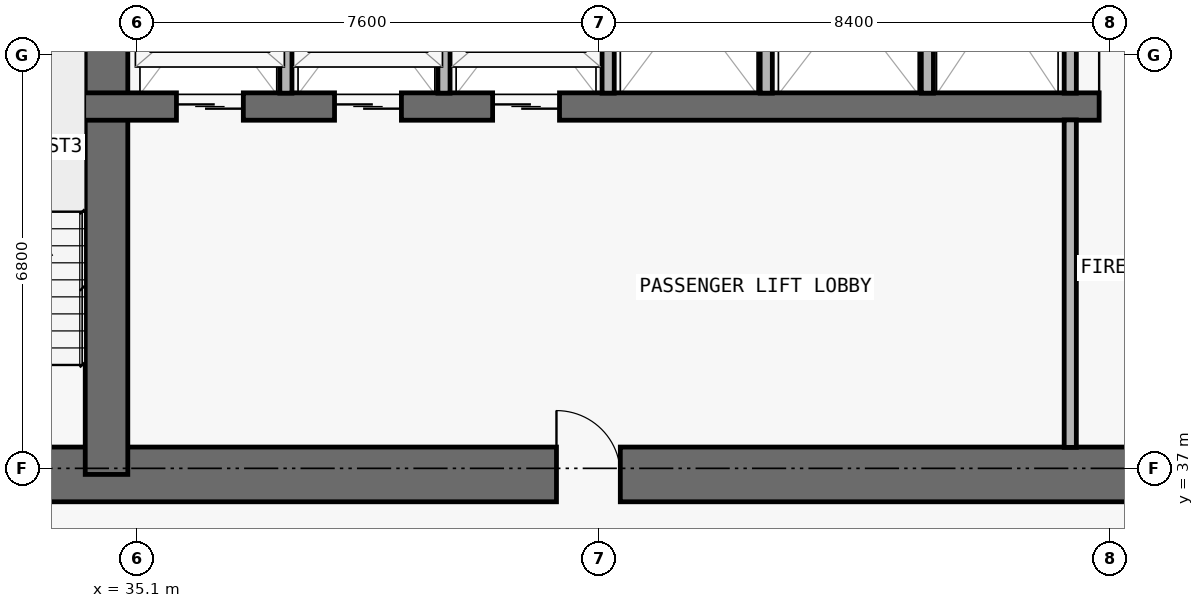
"""IFC4 building model, lengths in metres.
Left out: names, types, materials, properties, quantities, classifications, styles, units other than length and angle.
Written with IfcOpenShell. Run it as: python <this file> out.ifc"""

import sys

from ifc_helpers import new_model, si_unit, direction, frame, frame_2d, origin, place, context, subcontext, project, spatial, rectangle, extrude, element, fill, save


model = new_model("IFC4")
c1 = context("Model", 3, precision=1e-05, world=origin(), true_north=direction((0.0, 1.0)))
c2 = subcontext(c1, "Body", "Model", "MODEL_VIEW")
j1 = project(units=[si_unit("LENGTHUNIT", "METRE"), si_unit("PLANEANGLEUNIT", "RADIAN")], contexts=[c1])
p1 = place(None, origin())
s1 = spatial("IfcSite", under=j1, at=p1, CompositionType="ELEMENT")
p2 = place(p1, origin())
s2 = spatial("IfcBuilding", under=s1, at=p2, CompositionType="ELEMENT")
p3 = place(p2, frame((0.0, 0.0, 39.9)))
s3 = spatial("IfcBuildingStorey", under=s2, at=p3, CompositionType="ELEMENT", Elevation=39.9)
p4 = place(p3, frame((17.75, 36.9, 0.0), z_axis=(0.0, 0.0, 1.0), x_axis=(1.0, 0.0, 0.0)))
e1 = element("IfcWall", 1, at=p4, inside=s3, PredefinedType="SHEAR", context=c2, shape_type="SweptSolid", body=[
    extrude(rectangle(XDim=42.3, YDim=0.9, at=frame_2d((21.15, 0.0))), origin(), (0.0, 0.0, 1.0), 3.05),
])
p5 = place(p4, frame((14.55, 0.0, 0.0)))
e2 = element("IfcOpeningElement", 2, at=p5, cuts=e1, PredefinedType="OPENING", context=c2, shape_type="SweptSolid", body=[
    extrude(rectangle(XDim=1.1, YDim=2.15, at=frame_2d((0.55, 1.075))), frame((0.0, 0.46, 0.0), z_axis=(0.0, -1.0, 0.0), x_axis=(1.0, 0.0, 0.0)), (0.0, 0.0, 1.0), 0.92),
])
p6 = place(p4, frame((6.4, 0.0, 0.0)))
e3 = element("IfcOpeningElement", 3, at=p6, cuts=e1, PredefinedType="OPENING", context=c2, shape_type="SweptSolid", body=[
    extrude(rectangle(XDim=1.05, YDim=2.15, at=frame_2d((0.525, 1.075))), frame((0.0, 0.46, 0.0), z_axis=(0.0, -1.0, 0.0), x_axis=(1.0, 0.0, 0.0)), (0.0, 0.0, 1.0), 0.92),
])
p7 = place(p4, frame((34.9, 0.0, 0.0)))
e4 = element("IfcOpeningElement", 4, at=p7, cuts=e1, PredefinedType="OPENING", context=c2, shape_type="SweptSolid", body=[
    extrude(rectangle(XDim=1.05, YDim=2.15, at=frame_2d((0.525, 1.075))), frame((0.0, 0.46, 0.0), z_axis=(0.0, -1.0, 0.0), x_axis=(1.0, 0.0, 0.0)), (0.0, 0.0, 1.0), 0.92),
])
p8 = place(p4, frame((11.012, 0.0, 0.0)))
e5 = element("IfcOpeningElement", 5, at=p8, cuts=e1, PredefinedType="OPENING", context=c2, shape_type="SweptSolid", body=[
    extrude(rectangle(XDim=1.05, YDim=2.15, at=frame_2d((0.525, 1.075))), frame((0.0, 0.46, 0.0), z_axis=(0.0, -1.0, 0.0), x_axis=(1.0, 0.0, 0.0)), (0.0, 0.0, 1.0), 0.92),
])
p9 = place(p4, frame((24.25, 0.0, 0.0)))
e6 = element("IfcOpeningElement", 6, at=p9, cuts=e1, PredefinedType="OPENING", context=c2, shape_type="SweptSolid", body=[
    extrude(rectangle(XDim=1.05, YDim=2.15, at=frame_2d((0.525, 1.075))), frame((0.0, 0.46, 0.0), z_axis=(0.0, -1.0, 0.0), x_axis=(1.0, 0.0, 0.0)), (0.0, 0.0, 1.0), 0.92),
])
p10 = place(p3, frame((34.6, 36.9, 0.0), z_axis=(0.0, 0.0, 1.0), x_axis=(0.0, 1.0, 0.0)))
e7 = element("IfcWall", 7, at=p10, inside=s3, PredefinedType="SHEAR", context=c2, shape_type="SweptSolid", body=[
    extrude(rectangle(XDim=9.675, YDim=0.7, at=frame_2d((4.837, 0.0))), origin(), (0.0, 0.0, 1.0), 3.05),
])
p11 = place(p3, frame((22.25, 42.95, 0.0), z_axis=(0.0, 0.0, 1.0), x_axis=(1.0, 0.0, 0.0)))
e8 = element("IfcWall", 8, at=p11, inside=s3, PredefinedType="SHEAR", context=c2, shape_type="SweptSolid", body=[
    extrude(rectangle(XDim=33.3, YDim=0.45, at=frame_2d((16.65, 0.0))), origin(), (0.0, 0.0, 1.0), 3.05),
])
p12 = place(p11, frame((1.05, 0.0, 0.0)))
e9 = element("IfcOpeningElement", 9, at=p12, cuts=e8, PredefinedType="OPENING", context=c2, shape_type="SweptSolid", body=[
    extrude(rectangle(XDim=1.2, YDim=2.2, at=frame_2d((0.6, 1.1))), frame((0.0, 0.235, 0.0), z_axis=(0.0, -1.0, 0.0), x_axis=(1.0, 0.0, 0.0)), (0.0, 0.0, 1.0), 0.47),
])
p13 = place(p11, frame((31.05, 0.0, 0.0)))
e10 = element("IfcOpeningElement", 10, at=p13, cuts=e8, PredefinedType="OPENING", context=c2, shape_type="SweptSolid", body=[
    extrude(rectangle(XDim=1.2, YDim=2.2, at=frame_2d((0.6, 1.1))), frame((0.0, 0.235, 0.0), z_axis=(0.0, -1.0, 0.0), x_axis=(1.0, 0.0, 0.0)), (0.0, 0.0, 1.0), 0.47),
])
p14 = place(p11, frame((13.5, 0.0, 0.0)))
e11 = element("IfcOpeningElement", 11, at=p14, cuts=e8, PredefinedType="OPENING", context=c2, shape_type="SweptSolid", body=[
    extrude(rectangle(XDim=1.1, YDim=2.2, at=frame_2d((0.55, 1.1))), frame((0.0, 0.235, 0.0), z_axis=(0.0, -1.0, 0.0), x_axis=(1.0, 0.0, 0.0)), (0.0, 0.0, 1.0), 0.47),
])
p15 = place(p11, frame((16.1, 0.0, 0.0)))
e12 = element("IfcOpeningElement", 12, at=p15, cuts=e8, PredefinedType="OPENING", context=c2, shape_type="SweptSolid", body=[
    extrude(rectangle(XDim=1.1, YDim=2.2, at=frame_2d((0.55, 1.1))), frame((0.0, 0.235, 0.0), z_axis=(0.0, -1.0, 0.0), x_axis=(1.0, 0.0, 0.0)), (0.0, 0.0, 1.0), 0.47),
])
p16 = place(p11, frame((18.7, 0.0, 0.0)))
e13 = element("IfcOpeningElement", 13, at=p16, cuts=e8, PredefinedType="OPENING", context=c2, shape_type="SweptSolid", body=[
    extrude(rectangle(XDim=1.1, YDim=2.2, at=frame_2d((0.55, 1.1))), frame((0.0, 0.235, 0.0), z_axis=(0.0, -1.0, 0.0), x_axis=(1.0, 0.0, 0.0)), (0.0, 0.0, 1.0), 0.47),
])
p17 = place(p11, frame((3.625, 0.0, 0.0)))
e14 = element("IfcOpeningElement", 14, at=p17, cuts=e8, PredefinedType="OPENING", context=c2, shape_type="SweptSolid", body=[
    extrude(rectangle(XDim=1.05, YDim=2.15, at=frame_2d((0.525, 1.075))), frame((0.0, 0.235, 0.0), z_axis=(0.0, -1.0, 0.0), x_axis=(1.0, 0.0, 0.0)), (0.0, 0.0, 1.0), 0.47),
])
p18 = place(p11, frame((28.675, 0.0, 0.0)))
e15 = element("IfcOpeningElement", 15, at=p18, cuts=e8, PredefinedType="OPENING", context=c2, shape_type="SweptSolid", body=[
    extrude(rectangle(XDim=1.05, YDim=2.15, at=frame_2d((0.525, 1.075))), frame((0.0, 0.235, 0.0), z_axis=(0.0, -1.0, 0.0), x_axis=(1.0, 0.0, 0.0)), (0.0, 0.0, 1.0), 0.47),
])
for number, where, z_axis, x_axis in (
    (16, (37.55, 43.17, 0.0), (0.0, 0.0, 1.0), (0.0, 1.0, 0.0)),
    (17, (40.15, 43.17, 0.0), (0.0, 0.0, 1.0), (0.0, 1.0, 0.0)),
    (18, (42.85, 43.17, 0.0), (0.0, 0.0, 1.0), (0.0, 1.0, 0.0)),
    (19, (45.45, 43.17, 0.0), (0.0, 0.0, 1.0), (0.0, 1.0, 0.0)),
    (20, (48.1, 43.17, 0.0), (0.0, 0.0, 1.0), (0.0, 1.0, 0.0)),
):
    element("IfcWall", number, at=place(p3, frame(where, z_axis=z_axis, x_axis=x_axis)), inside=s3, PredefinedType="PARTITIONING", context=c2, shape_type="SweptSolid", body=[
        extrude(rectangle(XDim=3.185, YDim=0.2, at=frame_2d((1.593, 0.0))), origin(), (0.0, 0.0, 1.0), 3.05),
    ])
p19 = place(p3, frame((50.45, 37.345, 0.0), z_axis=(0.0, 0.0, 1.0), x_axis=(0.0, 1.0, 0.0)))
e21 = element("IfcWall", 21, at=p19, inside=s3, PredefinedType="PARTITIONING", context=c2, shape_type="SweptSolid", body=[
    extrude(rectangle(XDim=5.385, YDim=0.2, at=frame_2d((2.692, 0.0))), origin(), (0.0, 0.0, 1.0), 3.05),
])
p20 = place(p3, frame((50.45, 43.17, 0.0), z_axis=(0.0, 0.0, 1.0), x_axis=(0.0, 1.0, 0.0)))
e22 = element("IfcWall", 22, at=p20, inside=s3, PredefinedType="PARTITIONING", context=c2, shape_type="SweptSolid", body=[
    extrude(rectangle(XDim=3.185, YDim=0.2, at=frame_2d((1.593, 0.0))), origin(), (0.0, 0.0, 1.0), 3.05),
])
p21 = place(p14, origin())
e23 = element("IfcDoor", 23, at=p21, inside=s3, OperationType="DOUBLE_DOOR_SLIDING", PredefinedType="DOOR", context=c2, shape_type="SweptSolid", body=[
    extrude(rectangle(XDim=1.1, YDim=2.2, at=frame_2d((0.55, 1.1))), frame((0.0, 0.025, 0.0), z_axis=(0.0, -1.0, 0.0), x_axis=(1.0, 0.0, 0.0)), (0.0, 0.0, 1.0), 0.05),
])
fill(e11, e23)
p22 = place(p15, origin())
e24 = element("IfcDoor", 24, at=p22, inside=s3, OperationType="DOUBLE_DOOR_SLIDING", PredefinedType="DOOR", context=c2, shape_type="SweptSolid", body=[
    extrude(rectangle(XDim=1.1, YDim=2.2, at=frame_2d((0.55, 1.1))), frame((0.0, 0.025, 0.0), z_axis=(0.0, -1.0, 0.0), x_axis=(1.0, 0.0, 0.0)), (0.0, 0.0, 1.0), 0.05),
])
fill(e12, e24)
p23 = place(p16, origin())
e25 = element("IfcDoor", 25, at=p23, inside=s3, OperationType="DOUBLE_DOOR_SLIDING", PredefinedType="DOOR", context=c2, shape_type="SweptSolid", body=[
    extrude(rectangle(XDim=1.1, YDim=2.2, at=frame_2d((0.55, 1.1))), frame((0.0, 0.025, 0.0), z_axis=(0.0, -1.0, 0.0), x_axis=(1.0, 0.0, 0.0)), (0.0, 0.0, 1.0), 0.05),
])
fill(e13, e25)
p24 = place(p18, origin())
e26 = element("IfcDoor", 26, at=p24, inside=s3, OperationType="SINGLE_SWING_LEFT", PredefinedType="DOOR", context=c2, shape_type="SweptSolid", body=[
    extrude(rectangle(XDim=1.05, YDim=2.15, at=frame_2d((0.525, 1.075))), frame((0.0, 0.025, 0.0), z_axis=(0.0, -1.0, 0.0), x_axis=(1.0, 0.0, 0.0)), (0.0, 0.0, 1.0), 0.05),
])
fill(e15, e26)
p25 = place(p9, origin())
e27 = element("IfcDoor", 27, at=p25, inside=s3, OperationType="SINGLE_SWING_LEFT", PredefinedType="DOOR", context=c2, shape_type="SweptSolid", body=[
    extrude(rectangle(XDim=1.05, YDim=2.15, at=frame_2d((0.525, 1.075))), frame((0.0, 0.025, 0.0), z_axis=(0.0, -1.0, 0.0), x_axis=(1.0, 0.0, 0.0)), (0.0, 0.0, 1.0), 0.05),
])
fill(e6, e27)
save(model, sys.argv[1])
